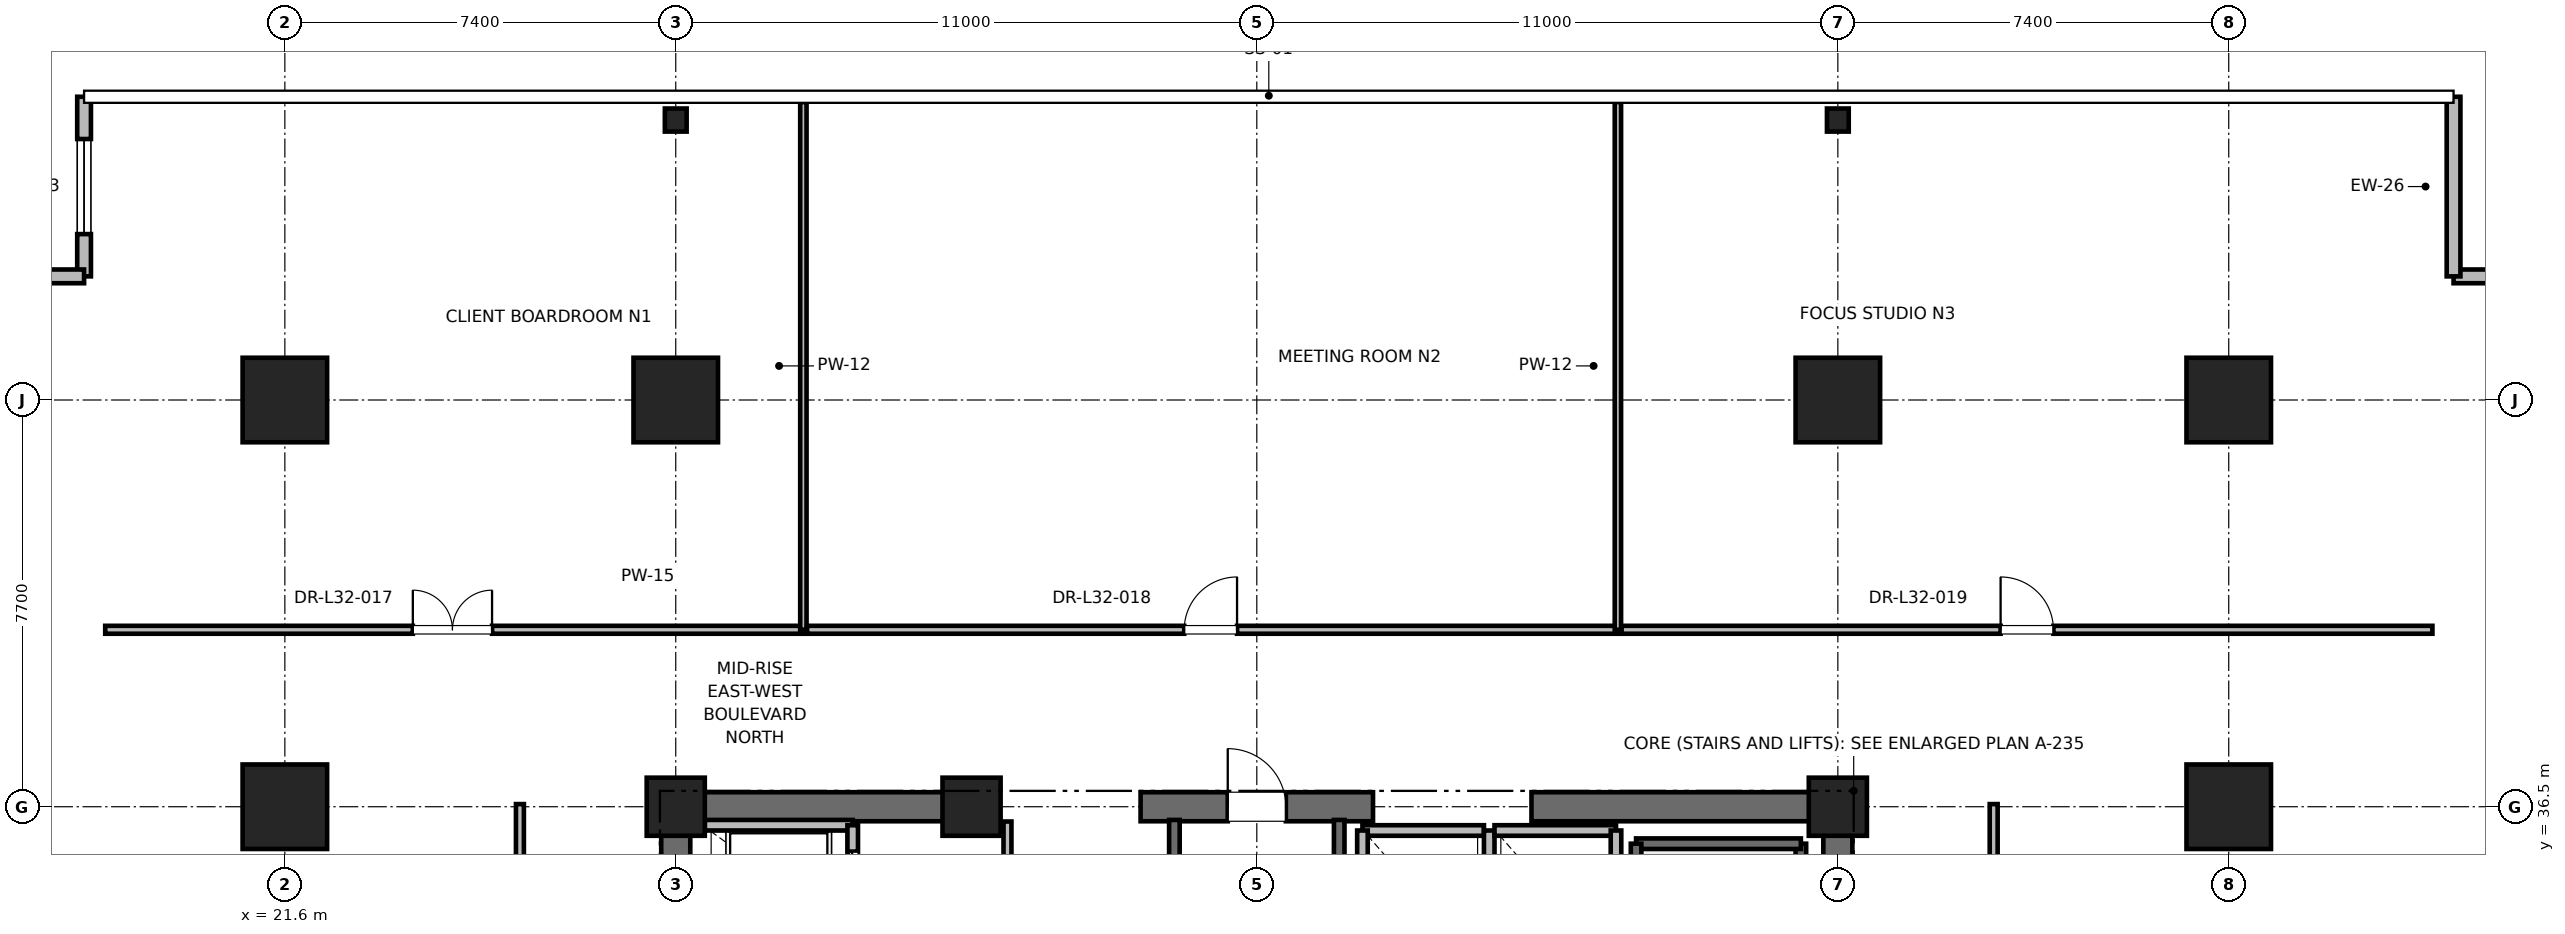
"""IFC4 building model, lengths in metres.
Left out: names, types, materials, properties, quantities, classifications, styles, units other than length and angle.
Written with IfcOpenShell. Run it as: python <this file> out.ifc"""

import sys

from ifc_helpers import new_model, si_unit, direction, frame, frame_2d, origin, origin_2d, place, context, subcontext, project, spatial, rectangle, i_section, extrude, element, fill, save


model = new_model("IFC4")
c1 = context("Model", 3, precision=1e-05, world=origin(), true_north=direction((0.0, 1.0)))
c2 = subcontext(c1, "Body", "Model", "MODEL_VIEW")
j1 = project(units=[si_unit("LENGTHUNIT", "METRE"), si_unit("PLANEANGLEUNIT", "RADIAN")], contexts=[c1])
p1 = place(None, origin())
s1 = spatial("IfcSite", under=j1, at=p1, CompositionType="ELEMENT")
p2 = place(p1, origin())
s2 = spatial("IfcBuilding", under=s1, at=p2, CompositionType="ELEMENT")
p3 = place(p2, frame((0.0, 0.0, 140.4)))
s3 = spatial("IfcBuildingStorey", under=s2, at=p3, CompositionType="ELEMENT", Elevation=140.4)
for number, where, z_axis, x_axis in (
    (1, (29.0, 44.2, 0.0), (0.0, 0.0, 1.0), (1.0, 0.0, 0.0)),
    (2, (51.0, 44.2, 0.0), (0.0, 0.0, 1.0), (1.0, 0.0, 0.0)),
    (3, (21.6, 36.5, 0.0), (0.0, 0.0, 1.0), (1.0, 0.0, 0.0)),
    (4, (58.4, 36.5, 0.0), (0.0, 0.0, 1.0), (1.0, 0.0, 0.0)),
    (5, (21.6, 44.2, 0.0), (0.0, 0.0, 1.0), (1.0, 0.0, 0.0)),
    (6, (58.4, 44.2, 0.0), (0.0, 0.0, 1.0), (1.0, 0.0, 0.0)),
):
    element("IfcColumn", number, at=place(p3, frame(where, z_axis=z_axis, x_axis=x_axis)), inside=s3, PredefinedType="COLUMN", context=c2, shape_type="SweptSolid", body=[
        extrude(rectangle(XDim=1.6, YDim=1.6, at=origin_2d()), origin(), (0.0, 0.0, 1.0), 4.0),
    ])
for number, where, z_axis, x_axis in (
    (7, (29.0, 49.5, 0.0), (0.0, 0.0, 1.0), (1.0, 0.0, 0.0)),
    (8, (51.0, 49.5, 0.0), (0.0, 0.0, 1.0), (1.0, 0.0, 0.0)),
):
    element("IfcColumn", number, at=place(p3, frame(where, z_axis=z_axis, x_axis=x_axis)), inside=s3, PredefinedType="COLUMN", context=c2, shape_type="SweptSolid", body=[
        extrude(i_section(OverallWidth=0.412, OverallDepth=0.437, WebThickness=0.036, FlangeThickness=0.058, FilletRadius=0.015, at=origin_2d()), origin(), (0.0, 0.0, 1.0), 4.0),
    ])
for number, where, z_axis, x_axis in (
    (9, (29.0, 36.5, 0.0), (0.0, 0.0, 1.0), (1.0, 0.0, 0.0)),
    (10, (51.0, 36.5, 0.0), (0.0, 0.0, 1.0), (1.0, 0.0, 0.0)),
    (11, (34.6, 36.5, 0.0), (0.0, 0.0, 1.0), (1.0, 0.0, 0.0)),
):
    element("IfcColumn", number, at=place(p3, frame(where, z_axis=z_axis, x_axis=x_axis)), inside=s3, PredefinedType="PILASTER", context=c2, shape_type="SweptSolid", body=[
        extrude(rectangle(XDim=1.1, YDim=1.1, at=origin_2d()), origin(), (0.0, 0.0, 1.0), 4.0),
    ])
p4 = place(p3, frame((29.0, 36.5, 0.0), z_axis=(0.0, 0.0, 1.0), x_axis=(1.0, 0.0, 0.0)))
e12 = element("IfcWall", 12, at=p4, inside=s3, PredefinedType="SHEAR", context=c2, shape_type="SweptSolid", body=[
    extrude(rectangle(XDim=5.8, YDim=0.55, at=frame_2d((2.9, 0.0))), origin(), (0.0, 0.0, 1.0), 3.775),
])
p5 = place(p3, frame((37.8, 36.5, 0.0), z_axis=(0.0, 0.0, 1.0), x_axis=(1.0, 0.0, 0.0)))
e13 = element("IfcWall", 13, at=p5, inside=s3, PredefinedType="SHEAR", context=c2, shape_type="SweptSolid", body=[
    extrude(rectangle(XDim=4.4, YDim=0.55, at=frame_2d((2.2, 0.0))), origin(), (0.0, 0.0, 1.0), 3.775),
])
p6 = place(p5, frame((1.65, 0.0, 0.0)))
e14 = element("IfcOpeningElement", 14, at=p6, cuts=e13, PredefinedType="OPENING", context=c2, shape_type="SweptSolid", body=[
    extrude(rectangle(XDim=1.1, YDim=2.15, at=frame_2d((0.55, 1.075))), frame((0.0, 0.275, 0.0), z_axis=(0.0, -1.0, 0.0), x_axis=(1.0, 0.0, 0.0)), (0.0, 0.0, 1.0), 0.55),
])
for number, where, z_axis, x_axis in (
    (15, (45.2, 36.5, 0.0), (0.0, 0.0, 1.0), (1.0, 0.0, 0.0)),
    (16, (29.0, 30.7, 0.0), (0.0, 0.0, 1.0), (0.0, 1.0, 0.0)),
):
    element("IfcWall", number, at=place(p3, frame(where, z_axis=z_axis, x_axis=x_axis)), inside=s3, PredefinedType="SHEAR", context=c2, shape_type="SweptSolid", body=[
        extrude(rectangle(XDim=5.8, YDim=0.55, at=frame_2d((2.9, 0.0))), origin(), (0.0, 0.0, 1.0), 3.775),
    ])
p7 = place(p3, frame((51.0, 27.7, 0.0), z_axis=(0.0, 0.0, 1.0), x_axis=(0.0, 1.0, 0.0)))
e17 = element("IfcWall", 17, at=p7, inside=s3, PredefinedType="SHEAR", context=c2, shape_type="SweptSolid", body=[
    extrude(rectangle(XDim=8.8, YDim=0.55, at=frame_2d((4.4, 0.0))), origin(), (0.0, 0.0, 1.0), 3.775),
])
p8 = place(p3, frame((66.456, 46.541, 0.0), z_axis=(0.0, 0.0, 1.0), x_axis=(-1.0, 0.0, 0.0)))
e18 = element("IfcWall", 18, at=p8, inside=s3, PredefinedType="PARAPET", context=c2, shape_type="SweptSolid", body=[
    extrude(rectangle(XDim=3.8, YDim=0.26, at=frame_2d((1.9, 0.0))), origin(), (0.0, 0.0, 1.0), 3.775),
])
p9 = place(p8, frame((1.0, 0.0, 0.85)))
e19 = element("IfcOpeningElement", 19, at=p9, cuts=e18, PredefinedType="OPENING", context=c2, shape_type="SweptSolid", body=[
    extrude(rectangle(XDim=1.8, YDim=2.2, at=frame_2d((0.9, 1.1))), frame((0.0, 0.13, 0.0), z_axis=(0.0, -1.0, 0.0), x_axis=(1.0, 0.0, 0.0)), (0.0, 0.0, 1.0), 0.26),
])
p10 = place(p3, frame((62.656, 46.541, 0.0), z_axis=(0.0, 0.0, 1.0), x_axis=(0.0, 1.0, 0.0)))
e20 = element("IfcWall", 20, at=p10, inside=s3, PredefinedType="PARAPET", context=c2, shape_type="SweptSolid", body=[
    extrude(rectangle(XDim=3.4, YDim=0.26, at=frame_2d((1.7, 0.0))), origin(), (0.0, 0.0, 1.0), 3.775),
])
p11 = place(p3, frame((17.799, 49.941, 0.0), z_axis=(0.0, 0.0, 1.0), x_axis=(0.0, -1.0, 0.0)))
e21 = element("IfcWall", 21, at=p11, inside=s3, PredefinedType="PARAPET", context=c2, shape_type="SweptSolid", body=[
    extrude(rectangle(XDim=3.4, YDim=0.26, at=frame_2d((1.7, 0.0))), origin(), (0.0, 0.0, 1.0), 3.775),
])
p12 = place(p11, frame((0.8, 0.0, 0.85)))
e22 = element("IfcOpeningElement", 22, at=p12, cuts=e21, PredefinedType="OPENING", context=c2, shape_type="SweptSolid", body=[
    extrude(rectangle(XDim=1.8, YDim=2.2, at=frame_2d((0.9, 1.1))), frame((0.0, 0.13, 0.0), z_axis=(0.0, -1.0, 0.0), x_axis=(1.0, 0.0, 0.0)), (0.0, 0.0, 1.0), 0.26),
])
p13 = place(p3, frame((17.799, 46.541, 0.0), z_axis=(0.0, 0.0, 1.0), x_axis=(-1.0, 0.0, 0.0)))
e23 = element("IfcWall", 23, at=p13, inside=s3, PredefinedType="PARAPET", context=c2, shape_type="SweptSolid", body=[
    extrude(rectangle(XDim=3.8, YDim=0.26, at=frame_2d((1.9, 0.0))), origin(), (0.0, 0.0, 1.0), 3.775),
])
p14 = place(p3, frame((50.3, 27.65, 0.0), z_axis=(0.0, 0.0, 1.0), x_axis=(0.0, 1.0, 0.0)))
e24 = element("IfcWall", 24, at=p14, inside=s3, PredefinedType="SOLIDWALL", context=c2, shape_type="SweptSolid", body=[
    extrude(rectangle(XDim=8.15, YDim=0.2, at=frame_2d((4.075, 0.0))), origin(), (0.0, 0.0, 1.0), 3.775),
])
p15 = place(p3, frame((47.18, 35.8, 0.0), z_axis=(0.0, 0.0, 1.0), x_axis=(1.0, 0.0, 0.0)))
e25 = element("IfcWall", 25, at=p15, inside=s3, PredefinedType="SOLIDWALL", context=c2, shape_type="SweptSolid", body=[
    extrude(rectangle(XDim=3.12, YDim=0.2, at=frame_2d((1.56, 0.0))), origin(), (0.0, 0.0, 1.0), 3.775),
])
p16 = place(p3, frame((47.18, 27.62, 0.0), z_axis=(0.0, 0.0, 1.0), x_axis=(0.0, 1.0, 0.0)))
e26 = element("IfcWall", 26, at=p16, inside=s3, PredefinedType="SOLIDWALL", context=c2, shape_type="SweptSolid", body=[
    extrude(rectangle(XDim=8.18, YDim=0.2, at=frame_2d((4.09, 0.0))), origin(), (0.0, 0.0, 1.0), 3.775),
])
p17 = place(p3, frame((38.44, 27.38, 0.0), z_axis=(0.0, 0.0, 1.0), x_axis=(0.0, 1.0, 0.0)))
e27 = element("IfcWall", 27, at=p17, inside=s3, PredefinedType="SOLIDWALL", context=c2, shape_type="SweptSolid", body=[
    extrude(rectangle(XDim=8.87, YDim=0.2, at=frame_2d((4.435, 0.0))), origin(), (0.0, 0.0, 1.0), 3.775),
])
p18 = place(p3, frame((41.56, 27.68, 0.0), z_axis=(0.0, 0.0, 1.0), x_axis=(0.0, 1.0, 0.0)))
e28 = element("IfcWall", 28, at=p18, inside=s3, PredefinedType="SOLIDWALL", context=c2, shape_type="SweptSolid", body=[
    extrude(rectangle(XDim=8.57, YDim=0.2, at=frame_2d((4.285, 0.0))), origin(), (0.0, 0.0, 1.0), 3.775),
])
p19 = place(p3, frame((32.35, 36.15, 0.0), z_axis=(0.0, 0.0, 1.0), x_axis=(-1.0, 0.0, 0.0)))
e29 = element("IfcWall", 29, at=p19, inside=s3, PredefinedType="SOLIDWALL", context=c2, shape_type="SweptSolid", body=[
    extrude(rectangle(XDim=2.8, YDim=0.2, at=frame_2d((1.4, 0.0))), origin(), (0.0, 0.0, 1.0), 2.985),
])
p20 = place(p3, frame((32.35, 34.05, 0.0), z_axis=(0.0, 0.0, 1.0), x_axis=(0.0, 1.0, 0.0)))
e30 = element("IfcWall", 30, at=p20, inside=s3, PredefinedType="SOLIDWALL", context=c2, shape_type="SweptSolid", body=[
    extrude(rectangle(XDim=2.1, YDim=0.2, at=frame_2d((1.05, 0.0))), origin(), (0.0, 0.0, 1.0), 3.775),
])
p21 = place(p20, frame((0.5, 0.0, 0.0)))
e31 = element("IfcOpeningElement", 31, at=p21, cuts=e30, PredefinedType="OPENING", context=c2, shape_type="SweptSolid", body=[
    extrude(rectangle(XDim=1.1, YDim=2.2, at=frame_2d((0.55, 1.1))), frame((0.0, 0.1, 0.0), z_axis=(0.0, -1.0, 0.0), x_axis=(1.0, 0.0, 0.0)), (0.0, 0.0, 1.0), 0.2),
])
p22 = place(p3, frame((44.3, 36.05, 0.0), z_axis=(0.0, 0.0, 1.0), x_axis=(-1.0, 0.0, 0.0)))
e32 = element("IfcWall", 32, at=p22, inside=s3, PredefinedType="SOLIDWALL", context=c2, shape_type="SweptSolid", body=[
    extrude(rectangle(XDim=2.3, YDim=0.2, at=frame_2d((1.15, 0.0))), origin(), (0.0, 0.0, 1.0), 2.755),
])
for number, where, z_axis, x_axis in (
    (33, (42.0, 36.05, 0.0), (0.0, 0.0, 1.0), (0.0, -1.0, 0.0)),
    (34, (44.4, 33.45, 0.0), (0.0, 0.0, 1.0), (0.0, 1.0, 0.0)),
):
    element("IfcWall", number, at=place(p3, frame(where, z_axis=z_axis, x_axis=x_axis)), inside=s3, PredefinedType="SOLIDWALL", context=c2, shape_type="SweptSolid", body=[
        extrude(rectangle(XDim=2.6, YDim=0.2, at=frame_2d((1.3, 0.0))), origin(), (0.0, 0.0, 1.0), 2.755),
    ])
p23 = place(p3, frame((46.8, 36.05, 0.0), z_axis=(0.0, 0.0, 1.0), x_axis=(-1.0, 0.0, 0.0)))
e35 = element("IfcWall", 35, at=p23, inside=s3, PredefinedType="SOLIDWALL", context=c2, shape_type="SweptSolid", body=[
    extrude(rectangle(XDim=2.3, YDim=0.2, at=frame_2d((1.15, 0.0))), origin(), (0.0, 0.0, 1.0), 2.755),
])
p24 = place(p3, frame((46.8, 33.45, 0.0), z_axis=(0.0, 0.0, 1.0), x_axis=(0.0, 1.0, 0.0)))
e36 = element("IfcWall", 36, at=p24, inside=s3, PredefinedType="SOLIDWALL", context=c2, shape_type="SweptSolid", body=[
    extrude(rectangle(XDim=2.6, YDim=0.2, at=frame_2d((1.3, 0.0))), origin(), (0.0, 0.0, 1.0), 3.775),
])
p25 = place(p3, frame((35.28, 33.95, 0.0), z_axis=(0.0, 0.0, 1.0), x_axis=(0.0, 1.0, 0.0)))
e37 = element("IfcWall", 37, at=p25, inside=s3, PredefinedType="PARTITIONING", context=c2, shape_type="SweptSolid", body=[
    extrude(rectangle(XDim=2.27, YDim=0.15, at=frame_2d((1.135, 0.0))), origin(), (0.0, 0.0, 1.0), 2.755),
])
p26 = place(p25, frame((0.66, 0.0, 0.0)))
e38 = element("IfcOpeningElement", 38, at=p26, cuts=e37, PredefinedType="OPENING", context=c2, shape_type="SweptSolid", body=[
    extrude(rectangle(XDim=0.95, YDim=2.15, at=frame_2d((0.475, 1.075))), frame((0.0, 0.075, 0.0), z_axis=(0.0, -1.0, 0.0), x_axis=(1.0, 0.0, 0.0)), (0.0, 0.0, 1.0), 0.15),
])
p27 = place(p3, frame((18.199, 39.85, 0.0), z_axis=(0.0, 0.0, 1.0), x_axis=(1.0, 0.0, 0.0)))
e39 = element("IfcWall", 39, at=p27, inside=s3, PredefinedType="PARTITIONING", context=c2, shape_type="SweptSolid", body=[
    extrude(rectangle(XDim=13.217, YDim=0.15, at=frame_2d((6.608, 0.0))), origin(), (0.0, 0.0, 1.0), 2.85),
])
p28 = place(p27, frame((5.823, 0.0, 0.0)))
e40 = element("IfcOpeningElement", 40, at=p28, cuts=e39, PredefinedType="OPENING", context=c2, shape_type="SweptSolid", body=[
    extrude(rectangle(XDim=1.5, YDim=2.25, at=frame_2d((0.75, 1.125))), frame((0.0, 0.075, 0.0), z_axis=(0.0, -1.0, 0.0), x_axis=(1.0, 0.0, 0.0)), (0.0, 0.0, 1.0), 0.15),
])
p29 = place(p3, frame((31.416, 39.85, 0.0), z_axis=(0.0, 0.0, 1.0), x_axis=(0.0, 1.0, 0.0)))
e41 = element("IfcWall", 41, at=p29, inside=s3, PredefinedType="PARTITIONING", context=c2, shape_type="SweptSolid", body=[
    extrude(rectangle(XDim=9.991, YDim=0.12, at=frame_2d((4.995, 0.0))), origin(), (0.0, 0.0, 1.0), 2.405),
])
p30 = place(p3, frame((31.486, 39.85, 0.0), z_axis=(0.0, 0.0, 1.0), x_axis=(1.0, 0.0, 0.0)))
e42 = element("IfcWall", 42, at=p30, inside=s3, PredefinedType="PARTITIONING", context=c2, shape_type="SweptSolid", body=[
    extrude(rectangle(XDim=15.35, YDim=0.15, at=frame_2d((7.675, 0.0))), origin(), (0.0, 0.0, 1.0), 2.85),
])
p31 = place(p30, frame((7.14, 0.0, 0.0)))
e43 = element("IfcOpeningElement", 43, at=p31, cuts=e42, PredefinedType="OPENING", context=c2, shape_type="SweptSolid", body=[
    extrude(rectangle(XDim=1.0, YDim=2.15, at=frame_2d((0.5, 1.075))), frame((0.0, 0.075, 0.0), z_axis=(0.0, -1.0, 0.0), x_axis=(1.0, 0.0, 0.0)), (0.0, 0.0, 1.0), 0.15),
])
p32 = place(p3, frame((46.836, 39.85, 0.0), z_axis=(0.0, 0.0, 1.0), x_axis=(0.0, 1.0, 0.0)))
e44 = element("IfcWall", 44, at=p32, inside=s3, PredefinedType="PARTITIONING", context=c2, shape_type="SweptSolid", body=[
    extrude(rectangle(XDim=9.991, YDim=0.12, at=frame_2d((4.995, 0.0))), origin(), (0.0, 0.0, 1.0), 2.405),
])
p33 = place(p3, frame((46.906, 39.85, 0.0), z_axis=(0.0, 0.0, 1.0), x_axis=(1.0, 0.0, 0.0)))
e45 = element("IfcWall", 45, at=p33, inside=s3, PredefinedType="PARTITIONING", context=c2, shape_type="SweptSolid", body=[
    extrude(rectangle(XDim=15.35, YDim=0.15, at=frame_2d((7.675, 0.0))), origin(), (0.0, 0.0, 1.0), 2.85),
])
p34 = place(p33, frame((7.175, 0.0, 0.0)))
e46 = element("IfcOpeningElement", 46, at=p34, cuts=e45, PredefinedType="OPENING", context=c2, shape_type="SweptSolid", body=[
    extrude(rectangle(XDim=1.0, YDim=2.15, at=frame_2d((0.5, 1.075))), frame((0.0, 0.075, 0.0), z_axis=(0.0, -1.0, 0.0), x_axis=(1.0, 0.0, 0.0)), (0.0, 0.0, 1.0), 0.15),
])
p35 = place(p3, frame((26.05, 18.45, 0.0), z_axis=(0.0, 0.0, 1.0), x_axis=(0.0, 1.0, 0.0)))
e47 = element("IfcWall", 47, at=p35, inside=s3, PredefinedType="PARTITIONING", context=c2, shape_type="SweptSolid", body=[
    extrude(rectangle(XDim=18.1, YDim=0.15, at=frame_2d((9.05, 0.0))), origin(), (0.0, 0.0, 1.0), 2.85),
])
p36 = place(p35, frame((8.55, 0.0, 0.0)))
e48 = element("IfcOpeningElement", 48, at=p36, cuts=e47, PredefinedType="OPENING", context=c2, shape_type="SweptSolid", body=[
    extrude(rectangle(XDim=1.0, YDim=2.15, at=frame_2d((0.5, 1.075))), frame((0.0, 0.075, 0.0), z_axis=(0.0, -1.0, 0.0), x_axis=(1.0, 0.0, 0.0)), (0.0, 0.0, 1.0), 0.15),
])
p37 = place(p3, frame((53.95, 30.828, 0.0), z_axis=(0.0, 0.0, 1.0), x_axis=(0.0, 1.0, 0.0)))
e49 = element("IfcWall", 49, at=p37, inside=s3, PredefinedType="PARTITIONING", context=c2, shape_type="SweptSolid", body=[
    extrude(rectangle(XDim=5.722, YDim=0.15, at=frame_2d((2.861, 0.0))), origin(), (0.0, 0.0, 1.0), 2.85),
])
p38 = place(p37, frame((2.036, 0.0, 0.0)))
e50 = element("IfcOpeningElement", 50, at=p38, cuts=e49, PredefinedType="OPENING", context=c2, shape_type="SweptSolid", body=[
    extrude(rectangle(XDim=1.5, YDim=2.25, at=frame_2d((0.75, 1.125))), frame((0.0, 0.075, 0.0), z_axis=(0.0, -1.0, 0.0), x_axis=(1.0, 0.0, 0.0)), (0.0, 0.0, 1.0), 0.15),
])
p39 = place(p12, origin())
e51 = element("IfcWindow", 51, at=p39, inside=s3, PartitioningType="SINGLE_PANEL", PredefinedType="WINDOW", context=c2, shape_type="SweptSolid", body=[
    extrude(rectangle(XDim=1.8, YDim=2.2, at=frame_2d((0.9, 1.1))), frame((0.0, 0.03, 0.0), z_axis=(0.0, -1.0, 0.0), x_axis=(1.0, 0.0, 0.0)), (0.0, 0.0, 1.0), 0.06),
])
fill(e22, e51)
p40 = place(p6, origin())
e52 = element("IfcDoor", 52, at=p40, inside=s3, OperationType="SINGLE_SWING_LEFT", PredefinedType="DOOR", context=c2, shape_type="SweptSolid", body=[
    extrude(rectangle(XDim=1.1, YDim=2.15, at=frame_2d((0.55, 1.075))), frame((0.0, 0.025, 0.0), z_axis=(0.0, -1.0, 0.0), x_axis=(1.0, 0.0, 0.0)), (0.0, 0.0, 1.0), 0.05),
])
fill(e14, e52)
p41 = place(p21, origin())
e53 = element("IfcDoor", 53, at=p41, inside=s3, OperationType="SLIDING_TO_RIGHT", PredefinedType="DOOR", context=c2, shape_type="SweptSolid", body=[
    extrude(rectangle(XDim=1.1, YDim=2.2, at=frame_2d((0.55, 1.1))), frame((0.0, 0.025, 0.0), z_axis=(0.0, -1.0, 0.0), x_axis=(1.0, 0.0, 0.0)), (0.0, 0.0, 1.0), 0.05),
])
fill(e31, e53)
p42 = place(p28, origin())
e54 = element("IfcDoor", 54, at=p42, inside=s3, OperationType="DOUBLE_DOOR_SINGLE_SWING", PredefinedType="DOOR", context=c2, shape_type="SweptSolid", body=[
    extrude(rectangle(XDim=1.5, YDim=2.25, at=frame_2d((0.75, 1.125))), frame((0.0, 0.025, 0.0), z_axis=(0.0, -1.0, 0.0), x_axis=(1.0, 0.0, 0.0)), (0.0, 0.0, 1.0), 0.05),
])
fill(e40, e54)
p43 = place(p31, origin())
e55 = element("IfcDoor", 55, at=p43, inside=s3, OperationType="SINGLE_SWING_RIGHT", PredefinedType="DOOR", context=c2, shape_type="SweptSolid", body=[
    extrude(rectangle(XDim=1.0, YDim=2.15, at=frame_2d((0.5, 1.075))), frame((0.0, 0.025, 0.0), z_axis=(0.0, -1.0, 0.0), x_axis=(1.0, 0.0, 0.0)), (0.0, 0.0, 1.0), 0.05),
])
fill(e43, e55)
p44 = place(p34, origin())
e56 = element("IfcDoor", 56, at=p44, inside=s3, OperationType="SINGLE_SWING_LEFT", PredefinedType="DOOR", context=c2, shape_type="SweptSolid", body=[
    extrude(rectangle(XDim=1.0, YDim=2.15, at=frame_2d((0.5, 1.075))), frame((0.0, 0.025, 0.0), z_axis=(0.0, -1.0, 0.0), x_axis=(1.0, 0.0, 0.0)), (0.0, 0.0, 1.0), 0.05),
])
fill(e46, e56)
save(model, sys.argv[1])
